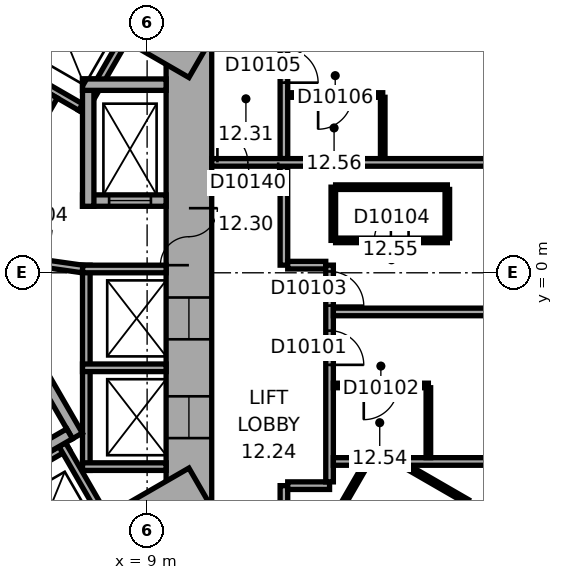
"""IFC4 building model, lengths in metres.
Left out: names, types, materials, properties, quantities, classifications, styles, units other than length and angle.
Written with IfcOpenShell. Run it as: python <this file> out.ifc"""

import sys

from ifc_helpers import new_model, si_unit, direction, frame, frame_2d, origin, place, context, subcontext, project, spatial, rectangle, extrude, element, fill, save


model = new_model("IFC4")
c1 = context("Model", 3, precision=1e-05, world=origin(), true_north=direction((0.0, 1.0)))
c2 = subcontext(c1, "Body", "Model", "MODEL_VIEW")
j1 = project(units=[si_unit("LENGTHUNIT", "METRE"), si_unit("PLANEANGLEUNIT", "RADIAN")], contexts=[c1])
p1 = place(None, origin())
s1 = spatial("IfcSite", under=j1, at=p1, CompositionType="ELEMENT")
p2 = place(p1, origin())
s2 = spatial("IfcBuilding", under=s1, at=p2, CompositionType="ELEMENT")
p3 = place(p2, frame((0.0, 0.0, 60.5)))
s3 = spatial("IfcBuildingStorey", under=s2, at=p3, CompositionType="ELEMENT", Elevation=60.5)
p4 = place(p3, frame((10.1, -6.177, 0.0), z_axis=(0.0, 0.0, 1.0), x_axis=(0.0, 1.0, 0.0)))
e1 = element("IfcWall", 1, at=p4, inside=s3, PredefinedType="SHEAR", context=c2, shape_type="SweptSolid", body=[
    extrude(rectangle(XDim=12.355, YDim=1.2, at=frame_2d((6.177, 0.0))), origin(), (0.0, 0.0, 1.0), 3.3),
])
p5 = place(p4, frame((6.378, 0.0, 0.0)))
e2 = element("IfcOpeningElement", 2, at=p5, cuts=e1, PredefinedType="OPENING", context=c2, shape_type="SweptSolid", body=[
    extrude(rectangle(XDim=1.5, YDim=2.1, at=frame_2d((0.75, 1.05))), frame((0.0, 0.61, 0.0), z_axis=(0.0, -1.0, 0.0), x_axis=(1.0, 0.0, 0.0)), (0.0, 0.0, 1.0), 1.22),
])
p6 = place(p4, frame((1.828, 0.0, 0.0)))
e3 = element("IfcOpeningElement", 3, at=p6, cuts=e1, PredefinedType="OPENING", context=c2, shape_type="SweptSolid", body=[
    extrude(rectangle(XDim=1.1, YDim=2.1, at=frame_2d((0.55, 1.05))), frame((0.0, 0.61, 0.0), z_axis=(0.0, -1.0, 0.0), x_axis=(1.0, 0.0, 0.0)), (0.0, 0.0, 1.0), 1.22),
])
p7 = place(p4, frame((4.427, 0.0, 0.0)))
e4 = element("IfcOpeningElement", 4, at=p7, cuts=e1, PredefinedType="OPENING", context=c2, shape_type="SweptSolid", body=[
    extrude(rectangle(XDim=1.1, YDim=2.1, at=frame_2d((0.55, 1.05))), frame((0.0, 0.61, 0.0), z_axis=(0.0, -1.0, 0.0), x_axis=(1.0, 0.0, 0.0)), (0.0, 0.0, 1.0), 1.22),
])
p8 = place(p3, frame((10.4, 5.658, 0.0), z_axis=(0.0, 0.0, 1.0), x_axis=(-0.866021384402, 0.500006961711, 0.0)))
e5 = element("IfcWall", 5, at=p8, inside=s3, PredefinedType="SHEAR", context=c2, shape_type="SweptSolid", body=[
    extrude(rectangle(XDim=12.355, YDim=1.2, at=frame_2d((6.178, 0.0))), origin(), (0.0, 0.0, 1.0), 3.3),
])
p9 = place(p8, frame((2.728, 0.0, 0.0)))
e6 = element("IfcOpeningElement", 6, at=p9, cuts=e5, PredefinedType="OPENING", context=c2, shape_type="SweptSolid", body=[
    extrude(rectangle(XDim=1.1, YDim=2.1, at=frame_2d((0.55, 1.05))), frame((0.0, 0.61, 0.0), z_axis=(0.0, -1.0, 0.0), x_axis=(1.0, 0.0, 0.0)), (0.0, 0.0, 1.0), 1.22),
])
p10 = place(p8, frame((5.328, 0.0, 0.0)))
e7 = element("IfcOpeningElement", 7, at=p10, cuts=e5, PredefinedType="OPENING", context=c2, shape_type="SweptSolid", body=[
    extrude(rectangle(XDim=1.1, YDim=2.1, at=frame_2d((0.55, 1.05))), frame((0.0, 0.61, 0.0), z_axis=(0.0, -1.0, 0.0), x_axis=(1.0, 0.0, 0.0)), (0.0, 0.0, 1.0), 1.22),
])
p11 = place(p8, frame((7.928, 0.0, 0.0)))
e8 = element("IfcOpeningElement", 8, at=p11, cuts=e5, PredefinedType="OPENING", context=c2, shape_type="SweptSolid", body=[
    extrude(rectangle(XDim=1.1, YDim=2.1, at=frame_2d((0.55, 1.05))), frame((0.0, 0.61, 0.0), z_axis=(0.0, -1.0, 0.0), x_axis=(1.0, 0.0, 0.0)), (0.0, 0.0, 1.0), 1.22),
])
p12 = place(p3, frame((-0.3, -11.836, 0.0), z_axis=(0.0, 0.0, 1.0), x_axis=(0.866021384402, 0.500006961711, 0.0)))
e9 = element("IfcWall", 9, at=p12, inside=s3, PredefinedType="SHEAR", context=c2, shape_type="SweptSolid", body=[
    extrude(rectangle(XDim=12.355, YDim=1.2, at=frame_2d((6.178, 0.0))), origin(), (0.0, 0.0, 1.0), 3.3),
])
p13 = place(p12, frame((4.128, 0.0, 0.0)))
e10 = element("IfcOpeningElement", 10, at=p13, cuts=e9, PredefinedType="OPENING", context=c2, shape_type="SweptSolid", body=[
    extrude(rectangle(XDim=0.9, YDim=2.1, at=frame_2d((0.45, 1.05))), frame((0.0, 0.61, 0.0), z_axis=(0.0, -1.0, 0.0), x_axis=(1.0, 0.0, 0.0)), (0.0, 0.0, 1.0), 1.22),
])
p14 = place(p12, frame((7.928, 0.0, 0.0)))
e11 = element("IfcOpeningElement", 11, at=p14, cuts=e9, PredefinedType="OPENING", context=c2, shape_type="SweptSolid", body=[
    extrude(rectangle(XDim=1.1, YDim=2.1, at=frame_2d((0.55, 1.05))), frame((0.0, 0.61, 0.0), z_axis=(0.0, -1.0, 0.0), x_axis=(1.0, 0.0, 0.0)), (0.0, 0.0, 1.0), 1.22),
])
p15 = place(p3, frame((7.4, -5.2, 0.0), z_axis=(0.0, 0.0, 1.0), x_axis=(0.0, 1.0, 0.0)))
e12 = element("IfcWall", 12, at=p15, inside=s3, PredefinedType="PARTITIONING", context=c2, shape_type="SweptSolid", body=[
    extrude(rectangle(XDim=5.4, YDim=0.2, at=frame_2d((2.7, 0.0))), origin(), (0.0, 0.0, 1.0), 3.05),
])
for number, where, z_axis, x_axis in (
    (13, (7.3, -5.1, 0.0), (0.0, 0.0, 1.0), (1.0, 0.0, 0.0)),
    (14, (7.3, -2.5, 0.0), (0.0, 0.0, 1.0), (1.0, 0.0, 0.0)),
    (15, (7.3, 0.1, 0.0), (0.0, 0.0, 1.0), (1.0, 0.0, 0.0)),
):
    element("IfcWall", number, at=place(p3, frame(where, z_axis=z_axis, x_axis=x_axis)), inside=s3, PredefinedType="PARTITIONING", context=c2, shape_type="SweptSolid", body=[
        extrude(rectangle(XDim=2.2, YDim=0.2, at=frame_2d((1.1, 0.0))), origin(), (0.0, 0.0, 1.0), 3.05),
    ])
p16 = place(p3, frame((7.424, 4.259, 0.0), z_axis=(0.0, 0.0, 1.0), x_axis=(-0.866026010844, 0.49999894854, 0.0)))
e16 = element("IfcWall", 16, at=p16, inside=s3, PredefinedType="PARTITIONING", context=c2, shape_type="SweptSolid", body=[
    extrude(rectangle(XDim=8.0, YDim=0.2, at=frame_2d((4.0, 0.0))), origin(), (0.0, 0.0, 1.0), 3.05),
])
p17 = place(p3, frame((7.287, 4.222, 0.0), z_axis=(0.0, 0.0, 1.0), x_axis=(0.499946605688, 0.86605622881, 0.0)))
e17 = element("IfcWall", 17, at=p17, inside=s3, PredefinedType="PARTITIONING", context=c2, shape_type="SweptSolid", body=[
    extrude(rectangle(XDim=2.2, YDim=0.2, at=frame_2d((1.1, 0.0))), origin(), (0.0, 0.0, 1.0), 3.05),
])
p18 = place(p3, frame((-0.024, -8.559, 0.0), z_axis=(0.0, 0.0, 1.0), x_axis=(0.866026010844, 0.49999894854, 0.0)))
e18 = element("IfcWall", 18, at=p18, inside=s3, PredefinedType="PARTITIONING", context=c2, shape_type="SweptSolid", body=[
    extrude(rectangle(XDim=8.0, YDim=0.2, at=frame_2d((4.0, 0.0))), origin(), (0.0, 0.0, 1.0), 3.05),
])
p19 = place(p3, frame((6.768, -4.522, 0.0), z_axis=(0.0, 0.0, 1.0), x_axis=(0.50002983664, -0.866008176907, 0.0)))
e19 = element("IfcWall", 19, at=p19, inside=s3, PredefinedType="PARTITIONING", context=c2, shape_type="SweptSolid", body=[
    extrude(rectangle(XDim=2.2, YDim=0.2, at=frame_2d((1.1, 0.0))), origin(), (0.0, 0.0, 1.0), 3.05),
])
p20 = place(p3, frame((4.158, 0.602, 0.0), z_axis=(0.0, 0.0, 1.0), x_axis=(0.499977259774, 0.866038532462, 0.0)))
e20 = element("IfcWall", 20, at=p20, inside=s3, PredefinedType="SHEAR", context=c2, shape_type="SweptSolid", body=[
    extrude(rectangle(XDim=4.7, YDim=0.3, at=frame_2d((2.35, 0.0))), origin(), (0.0, 0.0, 1.0), 3.05),
])
p21 = place(p20, frame((0.8, 0.0, 0.0)))
e21 = element("IfcOpeningElement", 21, at=p21, cuts=e20, PredefinedType="OPENING", context=c2, shape_type="SweptSolid", body=[
    extrude(rectangle(XDim=1.2, YDim=2.1, at=frame_2d((0.6, 1.05))), frame((0.0, 0.16, 0.0), z_axis=(0.0, -1.0, 0.0), x_axis=(1.0, 0.0, 0.0)), (0.0, 0.0, 1.0), 0.32),
])
p22 = place(p3, frame((4.816, -0.222, 0.0), z_axis=(0.0, 0.0, 1.0), x_axis=(0.499977259774, -0.866038532462, 0.0)))
e22 = element("IfcWall", 22, at=p22, inside=s3, PredefinedType="SHEAR", context=c2, shape_type="SweptSolid", body=[
    extrude(rectangle(XDim=4.7, YDim=0.3, at=frame_2d((2.35, 0.0))), origin(), (0.0, 0.0, 1.0), 3.05),
])
p23 = place(p3, frame((0.847, -7.767, 0.0), z_axis=(0.0, 0.0, 1.0), x_axis=(0.866027801685, 0.499995846692, 0.0)))
e23 = element("IfcWall", 23, at=p23, inside=s3, PredefinedType="SHEAR", context=c2, shape_type="SweptSolid", body=[
    extrude(rectangle(XDim=7.06, YDim=0.3, at=frame_2d((3.53, 0.0))), origin(), (0.0, 0.0, 1.0), 3.05),
])
p24 = place(p3, frame((7.3, 1.9, 0.0), z_axis=(0.0, 0.0, 1.0), x_axis=(1.0, 0.0, 0.0)))
e24 = element("IfcWall", 24, at=p24, inside=s3, PredefinedType="SHEAR", context=c2, shape_type="SweptSolid", body=[
    extrude(rectangle(XDim=2.2, YDim=0.3, at=frame_2d((1.1, 0.0))), origin(), (0.0, 0.0, 1.0), 3.05),
])
p25 = place(p24, frame((0.7, 0.0, 0.0)))
e25 = element("IfcOpeningElement", 25, at=p25, cuts=e24, PredefinedType="OPENING", context=c2, shape_type="SweptSolid", body=[
    extrude(rectangle(XDim=1.1, YDim=2.1, at=frame_2d((0.55, 1.05))), frame((0.0, 0.16, 0.0), z_axis=(0.0, -1.0, 0.0), x_axis=(1.0, 0.0, 0.0)), (0.0, 0.0, 1.0), 0.32),
])
p26 = place(p3, frame((7.45, 1.75, 0.0), z_axis=(0.0, 0.0, 1.0), x_axis=(0.0, 1.0, 0.0)))
e26 = element("IfcWall", 26, at=p26, inside=s3, PredefinedType="SHEAR", context=c2, shape_type="SweptSolid", body=[
    extrude(rectangle(XDim=3.35, YDim=0.3, at=frame_2d((1.675, 0.0))), origin(), (0.0, 0.0, 1.0), 3.05),
])
p27 = place(p3, frame((7.3, 4.95, 0.0), z_axis=(0.0, 0.0, 1.0), x_axis=(1.0, 0.0, 0.0)))
e27 = element("IfcWall", 27, at=p27, inside=s3, PredefinedType="SHEAR", context=c2, shape_type="SweptSolid", body=[
    extrude(rectangle(XDim=2.2, YDim=0.3, at=frame_2d((1.1, 0.0))), origin(), (0.0, 0.0, 1.0), 3.05),
])
p28 = place(p3, frame((4.327, 0.521, 0.0), z_axis=(0.0, 0.0, 1.0), x_axis=(0.990124376366, -0.14019172346, 0.0)))
e28 = element("IfcWall", 28, at=p28, inside=s3, PredefinedType="PARTITIONING", context=c2, shape_type="SweptSolid", body=[
    extrude(rectangle(XDim=3.002, YDim=0.2, at=frame_2d((1.501, 0.0))), origin(), (0.0, 0.0, 1.0), 3.05),
])
p29 = place(p28, frame((1.15, 0.0, 0.0)))
e29 = element("IfcOpeningElement", 29, at=p29, cuts=e28, PredefinedType="OPENING", context=c2, shape_type="SweptSolid", body=[
    extrude(rectangle(XDim=0.9, YDim=2.1, at=frame_2d((0.45, 1.05))), frame((0.0, 0.11, 0.0), z_axis=(0.0, -1.0, 0.0), x_axis=(1.0, 0.0, 0.0)), (0.0, 0.0, 1.0), 0.22),
])
p30 = place(p3, frame((12.6, -6.138, 0.0), z_axis=(0.0, 0.0, 1.0), x_axis=(0.0, 1.0, 0.0)))
e30 = element("IfcWall", 30, at=p30, inside=s3, PredefinedType="PARTITIONING", context=c2, shape_type="SweptSolid", body=[
    extrude(rectangle(XDim=0.537, YDim=0.2, at=frame_2d((0.268, 0.0))), origin(), (0.0, 0.0, 1.0), 3.05),
])
p31 = place(p3, frame((12.6, 0.201, 0.0), z_axis=(0.0, 0.0, 1.0), x_axis=(0.0, 1.0, 0.0)))
e31 = element("IfcWall", 31, at=p31, inside=s3, PredefinedType="PARTITIONING", context=c2, shape_type="SweptSolid", body=[
    extrude(rectangle(XDim=2.604, YDim=0.2, at=frame_2d((1.302, 0.0))), origin(), (0.0, 0.0, 1.0), 3.05),
])
p32 = place(p3, frame((12.6, 3.004, 0.0), z_axis=(0.0, 0.0, 1.0), x_axis=(0.0, 1.0, 0.0)))
e32 = element("IfcWall", 32, at=p32, inside=s3, PredefinedType="PARTITIONING", context=c2, shape_type="SweptSolid", body=[
    extrude(rectangle(XDim=3.173, YDim=0.2, at=frame_2d((1.586, 0.0))), origin(), (0.0, 0.0, 1.0), 3.05),
])
p33 = place(p32, frame((1.998, 0.0, 0.0)))
e33 = element("IfcOpeningElement", 33, at=p33, cuts=e32, PredefinedType="OPENING", context=c2, shape_type="SweptSolid", body=[
    extrude(rectangle(XDim=0.9, YDim=2.1, at=frame_2d((0.45, 1.05))), frame((0.0, 0.11, 0.0), z_axis=(0.0, -1.0, 0.0), x_axis=(1.0, 0.0, 0.0)), (0.0, 0.0, 1.0), 0.22),
])
p34 = place(p3, frame((12.7, -5.601, 0.0), z_axis=(0.0, 0.0, 1.0), x_axis=(1.0, 0.0, 0.0)))
e34 = element("IfcWall", 34, at=p34, inside=s3, PredefinedType="PARTITIONING", context=c2, shape_type="SweptSolid", body=[
    extrude(rectangle(XDim=1.101, YDim=0.2, at=frame_2d((0.551, 0.0))), origin(), (0.0, 0.0, 1.0), 3.05),
])
p35 = place(p3, frame((12.7, 4.677, 0.0), z_axis=(0.0, 0.0, 1.0), x_axis=(1.0, 0.0, 0.0)))
e35 = element("IfcWall", 35, at=p35, inside=s3, PredefinedType="PARTITIONING", context=c2, shape_type="SweptSolid", body=[
    extrude(rectangle(XDim=2.5, YDim=0.12, at=frame_2d((1.25, 0.0))), origin(), (0.0, 0.0, 1.0), 3.05),
])
p36 = place(p35, frame((0.8, 0.0, 0.0)))
e36 = element("IfcOpeningElement", 36, at=p36, cuts=e35, PredefinedType="OPENING", context=c2, shape_type="SweptSolid", body=[
    extrude(rectangle(XDim=0.9, YDim=2.1, at=frame_2d((0.45, 1.05))), frame((0.0, 0.07, 0.0), z_axis=(0.0, -1.0, 0.0), x_axis=(1.0, 0.0, 0.0)), (0.0, 0.0, 1.0), 0.14),
])
p37 = place(p3, frame((13.701, 0.201, 0.0), z_axis=(0.0, 0.0, 1.0), x_axis=(-1.0, 0.0, 0.0)))
e37 = element("IfcWall", 37, at=p37, inside=s3, PredefinedType="PARTITIONING", context=c2, shape_type="SweptSolid", body=[
    extrude(rectangle(XDim=1.001, YDim=0.2, at=frame_2d((0.5, 0.0))), origin(), (0.0, 0.0, 1.0), 3.05),
])
p38 = place(p3, frame((13.801, -5.501, 0.0), z_axis=(0.0, 0.0, 1.0), x_axis=(0.0, 1.0, 0.0)))
e38 = element("IfcWall", 38, at=p38, inside=s3, PredefinedType="PARTITIONING", context=c2, shape_type="SweptSolid", body=[
    extrude(rectangle(XDim=5.702, YDim=0.2, at=frame_2d((2.851, 0.0))), origin(), (0.0, 0.0, 1.0), 3.05),
])
p39 = place(p38, frame((3.079, 0.0, 0.0)))
e39 = element("IfcOpeningElement", 39, at=p39, cuts=e38, PredefinedType="OPENING", context=c2, shape_type="SweptSolid", body=[
    extrude(rectangle(XDim=0.9, YDim=2.1, at=frame_2d((0.45, 1.05))), frame((0.0, 0.11, 0.0), z_axis=(0.0, -1.0, 0.0), x_axis=(1.0, 0.0, 0.0)), (0.0, 0.0, 1.0), 0.22),
])
p40 = place(p38, frame((4.636, 0.0, 0.0)))
e40 = element("IfcOpeningElement", 40, at=p40, cuts=e38, PredefinedType="OPENING", context=c2, shape_type="SweptSolid", body=[
    extrude(rectangle(XDim=0.9, YDim=2.1, at=frame_2d((0.45, 1.05))), frame((0.0, 0.11, 0.0), z_axis=(0.0, -1.0, 0.0), x_axis=(1.0, 0.0, 0.0)), (0.0, 0.0, 1.0), 0.22),
])
p41 = place(p3, frame((13.901, -6.524, 0.0), z_axis=(0.0, 0.0, 1.0), x_axis=(0.499964162598, 0.86604609353, 0.0)))
e41 = element("IfcWall", 41, at=p41, inside=s3, PredefinedType="PARTITIONING", context=c2, shape_type="SweptSolid", body=[
    extrude(rectangle(XDim=1.661, YDim=0.12, at=frame_2d((0.831, 0.0))), origin(), (0.0, 0.0, 1.0), 3.05),
])
p42 = place(p3, frame((13.901, -4.965, 0.0), z_axis=(0.0, 0.0, 1.0), x_axis=(1.0, 0.0, 0.0)))
e42 = element("IfcWall", 42, at=p42, inside=s3, PredefinedType="PARTITIONING", context=c2, shape_type="SweptSolid", body=[
    extrude(rectangle(XDim=8.049, YDim=0.2, at=frame_2d((4.024, 0.0))), origin(), (0.0, 0.0, 1.0), 3.05),
])
p43 = place(p3, frame((13.901, -2.965, 0.0), z_axis=(0.0, 0.0, 1.0), x_axis=(1.0, 0.0, 0.0)))
e43 = element("IfcWall", 43, at=p43, inside=s3, PredefinedType="PARTITIONING", context=c2, shape_type="SweptSolid", body=[
    extrude(rectangle(XDim=2.5, YDim=0.12, at=frame_2d((1.25, 0.0))), origin(), (0.0, 0.0, 1.0), 3.05),
])
p44 = place(p43, frame((0.8, 0.0, 0.0)))
e44 = element("IfcOpeningElement", 44, at=p44, cuts=e43, PredefinedType="OPENING", context=c2, shape_type="SweptSolid", body=[
    extrude(rectangle(XDim=0.9, YDim=2.1, at=frame_2d((0.45, 1.05))), frame((0.0, 0.07, 0.0), z_axis=(0.0, -1.0, 0.0), x_axis=(1.0, 0.0, 0.0)), (0.0, 0.0, 1.0), 0.14),
])
p45 = place(p3, frame((13.9, 0.853, 0.0), z_axis=(0.0, 0.0, 1.0), x_axis=(0.0, 1.0, 0.0)))
e45 = element("IfcWall", 45, at=p45, inside=s3, PredefinedType="PARTITIONING", context=c2, shape_type="SweptSolid", body=[
    extrude(rectangle(XDim=1.4, YDim=0.12, at=frame_2d((0.7, 0.0))), origin(), (0.0, 0.0, 1.0), 3.05),
])
p46 = place(p3, frame((13.96, 2.253, 0.0), z_axis=(0.0, 0.0, 1.0), x_axis=(1.0, 0.0, 0.0)))
e46 = element("IfcWall", 46, at=p46, inside=s3, PredefinedType="PARTITIONING", context=c2, shape_type="SweptSolid", body=[
    extrude(rectangle(XDim=2.94, YDim=0.12, at=frame_2d((1.47, 0.0))), origin(), (0.0, 0.0, 1.0), 3.05),
])
p47 = place(p3, frame((15.2, 4.618, 0.0), z_axis=(0.0, 0.0, 1.0), x_axis=(0.0, -1.0, 0.0)))
e47 = element("IfcWall", 47, at=p47, inside=s3, PredefinedType="PARTITIONING", context=c2, shape_type="SweptSolid", body=[
    extrude(rectangle(XDim=1.613, YDim=0.12, at=frame_2d((0.807, 0.0))), origin(), (0.0, 0.0, 1.0), 3.05),
])
p48 = place(p3, frame((15.841, -5.104, 0.0), z_axis=(0.0, 0.0, 1.0), x_axis=(0.866025591402, -0.499999675036, 0.0)))
e48 = element("IfcWall", 48, at=p48, inside=s3, PredefinedType="PARTITIONING", context=c2, shape_type="SweptSolid", body=[
    extrude(rectangle(XDim=1.83, YDim=0.12, at=frame_2d((0.915, 0.0))), origin(), (0.0, 0.0, 1.0), 3.05),
])
p49 = place(p3, frame((16.401, -3.025, 0.0), z_axis=(0.0, 0.0, 1.0), x_axis=(0.0, -1.0, 0.0)))
e49 = element("IfcWall", 49, at=p49, inside=s3, PredefinedType="PARTITIONING", context=c2, shape_type="SweptSolid", body=[
    extrude(rectangle(XDim=1.84, YDim=0.12, at=frame_2d((0.92, 0.0))), origin(), (0.0, 0.0, 1.0), 3.05),
])
p50 = place(p3, frame((16.9, 0.853, 0.0), z_axis=(0.0, 0.0, 1.0), x_axis=(-1.0, 0.0, 0.0)))
e50 = element("IfcWall", 50, at=p50, inside=s3, PredefinedType="PARTITIONING", context=c2, shape_type="SweptSolid", body=[
    extrude(rectangle(XDim=2.94, YDim=0.12, at=frame_2d((1.47, 0.0))), origin(), (0.0, 0.0, 1.0), 3.05),
])
p51 = place(p50, frame((1.02, 0.0, 0.0)))
e51 = element("IfcOpeningElement", 51, at=p51, cuts=e50, PredefinedType="OPENING", context=c2, shape_type="SweptSolid", body=[
    extrude(rectangle(XDim=0.9, YDim=2.1, at=frame_2d((0.45, 1.05))), frame((0.0, 0.07, 0.0), z_axis=(0.0, -1.0, 0.0), x_axis=(1.0, 0.0, 0.0)), (0.0, 0.0, 1.0), 0.14),
])
p52 = place(p3, frame((16.9, 2.193, 0.0), z_axis=(0.0, 0.0, 1.0), x_axis=(0.0, -1.0, 0.0)))
e52 = element("IfcWall", 52, at=p52, inside=s3, PredefinedType="PARTITIONING", context=c2, shape_type="SweptSolid", body=[
    extrude(rectangle(XDim=1.28, YDim=0.12, at=frame_2d((0.64, 0.0))), origin(), (0.0, 0.0, 1.0), 3.05),
])
p53 = place(p3, frame((21.95, -1.03, 0.0), z_axis=(0.0, 0.0, 1.0), x_axis=(-1.0, 0.0, 0.0)))
e53 = element("IfcWall", 53, at=p53, inside=s3, PredefinedType="PARTITIONING", context=c2, shape_type="SweptSolid", body=[
    extrude(rectangle(XDim=8.049, YDim=0.2, at=frame_2d((4.024, 0.0))), origin(), (0.0, 0.0, 1.0), 2.6),
])
p54 = place(p3, frame((21.95, 2.905, 0.0), z_axis=(0.0, 0.0, 1.0), x_axis=(-1.0, 0.0, 0.0)))
e54 = element("IfcWall", 54, at=p54, inside=s3, PredefinedType="PARTITIONING", context=c2, shape_type="SweptSolid", body=[
    extrude(rectangle(XDim=11.25, YDim=0.2, at=frame_2d((5.625, 0.0))), origin(), (0.0, 0.0, 1.0), 3.05),
])
p55 = place(p54, frame((9.5, 0.0, 0.0)))
e55 = element("IfcOpeningElement", 55, at=p55, cuts=e54, PredefinedType="OPENING", context=c2, shape_type="SweptSolid", body=[
    extrude(rectangle(XDim=1.6, YDim=2.1, at=frame_2d((0.8, 1.05))), frame((0.0, 0.11, 0.0), z_axis=(0.0, -1.0, 0.0), x_axis=(1.0, 0.0, 0.0)), (0.0, 0.0, 1.0), 0.22),
])
p56 = place(p5, origin())
e56 = element("IfcDoor", 56, at=p56, inside=s3, OperationType="DOUBLE_DOOR_SINGLE_SWING", PredefinedType="DOOR", context=c2, shape_type="SweptSolid", body=[
    extrude(rectangle(XDim=1.5, YDim=2.1, at=frame_2d((0.75, 1.05))), frame((0.0, 0.025, 0.0), z_axis=(0.0, -1.0, 0.0), x_axis=(1.0, 0.0, 0.0)), (0.0, 0.0, 1.0), 0.05),
])
fill(e2, e56)
p57 = place(p25, origin())
e57 = element("IfcDoor", 57, at=p57, inside=s3, OperationType="DOUBLE_DOOR_SLIDING", PredefinedType="DOOR", context=c2, shape_type="SweptSolid", body=[
    extrude(rectangle(XDim=1.1, YDim=2.1, at=frame_2d((0.55, 1.05))), frame((0.0, 0.025, 0.0), z_axis=(0.0, -1.0, 0.0), x_axis=(1.0, 0.0, 0.0)), (0.0, 0.0, 1.0), 0.05),
])
fill(e25, e57)
p58 = place(p6, origin())
e58 = element("IfcDoor", 58, at=p58, inside=s3, OperationType="DOUBLE_DOOR_SLIDING", PredefinedType="DOOR", context=c2, shape_type="SweptSolid", body=[
    extrude(rectangle(XDim=1.1, YDim=2.1, at=frame_2d((0.55, 1.05))), frame((0.0, 0.025, 0.0), z_axis=(0.0, -1.0, 0.0), x_axis=(1.0, 0.0, 0.0)), (0.0, 0.0, 1.0), 0.05),
])
fill(e3, e58)
p59 = place(p7, origin())
e59 = element("IfcDoor", 59, at=p59, inside=s3, OperationType="DOUBLE_DOOR_SLIDING", PredefinedType="DOOR", context=c2, shape_type="SweptSolid", body=[
    extrude(rectangle(XDim=1.1, YDim=2.1, at=frame_2d((0.55, 1.05))), frame((0.0, 0.025, 0.0), z_axis=(0.0, -1.0, 0.0), x_axis=(1.0, 0.0, 0.0)), (0.0, 0.0, 1.0), 0.05),
])
fill(e4, e59)
p60 = place(p39, origin())
e60 = element("IfcDoor", 60, at=p60, inside=s3, OperationType="SINGLE_SWING_LEFT", PredefinedType="DOOR", context=c2, shape_type="SweptSolid", body=[
    extrude(rectangle(XDim=0.9, YDim=2.1, at=frame_2d((0.45, 1.05))), frame((0.0, 0.025, 0.0), z_axis=(0.0, -1.0, 0.0), x_axis=(1.0, 0.0, 0.0)), (0.0, 0.0, 1.0), 0.05),
])
fill(e39, e60)
p61 = place(p44, origin())
e61 = element("IfcDoor", 61, at=p61, inside=s3, OperationType="SINGLE_SWING_LEFT", PredefinedType="DOOR", context=c2, shape_type="SweptSolid", body=[
    extrude(rectangle(XDim=0.9, YDim=2.1, at=frame_2d((0.45, 1.05))), frame((0.0, 0.025, 0.0), z_axis=(0.0, -1.0, 0.0), x_axis=(1.0, 0.0, 0.0)), (0.0, 0.0, 1.0), 0.05),
])
fill(e44, e61)
p62 = place(p40, origin())
e62 = element("IfcDoor", 62, at=p62, inside=s3, OperationType="SINGLE_SWING_LEFT", PredefinedType="DOOR", context=c2, shape_type="SweptSolid", body=[
    extrude(rectangle(XDim=0.9, YDim=2.1, at=frame_2d((0.45, 1.05))), frame((0.0, 0.025, 0.0), z_axis=(0.0, -1.0, 0.0), x_axis=(1.0, 0.0, 0.0)), (0.0, 0.0, 1.0), 0.05),
])
fill(e40, e62)
p63 = place(p51, origin())
e63 = element("IfcDoor", 63, at=p63, inside=s3, OperationType="SINGLE_SWING_LEFT", PredefinedType="DOOR", context=c2, shape_type="SweptSolid", body=[
    extrude(rectangle(XDim=0.9, YDim=2.1, at=frame_2d((0.45, 1.05))), frame((0.0, 0.025, 0.0), z_axis=(0.0, -1.0, 0.0), x_axis=(1.0, 0.0, 0.0)), (0.0, 0.0, 1.0), 0.05),
])
fill(e51, e63)
p64 = place(p33, origin())
e64 = element("IfcDoor", 64, at=p64, inside=s3, OperationType="SINGLE_SWING_LEFT", PredefinedType="DOOR", context=c2, shape_type="SweptSolid", body=[
    extrude(rectangle(XDim=0.9, YDim=2.1, at=frame_2d((0.45, 1.05))), frame((0.0, 0.025, 0.0), z_axis=(0.0, -1.0, 0.0), x_axis=(1.0, 0.0, 0.0)), (0.0, 0.0, 1.0), 0.05),
])
fill(e33, e64)
p65 = place(p36, origin())
e65 = element("IfcDoor", 65, at=p65, inside=s3, OperationType="SINGLE_SWING_LEFT", PredefinedType="DOOR", context=c2, shape_type="SweptSolid", body=[
    extrude(rectangle(XDim=0.9, YDim=2.1, at=frame_2d((0.45, 1.05))), frame((0.0, 0.025, 0.0), z_axis=(0.0, -1.0, 0.0), x_axis=(1.0, 0.0, 0.0)), (0.0, 0.0, 1.0), 0.05),
])
fill(e36, e65)
p66 = place(p55, origin())
e66 = element("IfcDoor", 66, at=p66, inside=s3, OperationType="DOUBLE_DOOR_SINGLE_SWING", PredefinedType="DOOR", context=c2, shape_type="SweptSolid", body=[
    extrude(rectangle(XDim=1.6, YDim=2.1, at=frame_2d((0.8, 1.05))), frame((0.0, 0.025, 0.0), z_axis=(0.0, -1.0, 0.0), x_axis=(1.0, 0.0, 0.0)), (0.0, 0.0, 1.0), 0.05),
])
fill(e55, e66)
save(model, sys.argv[1])
